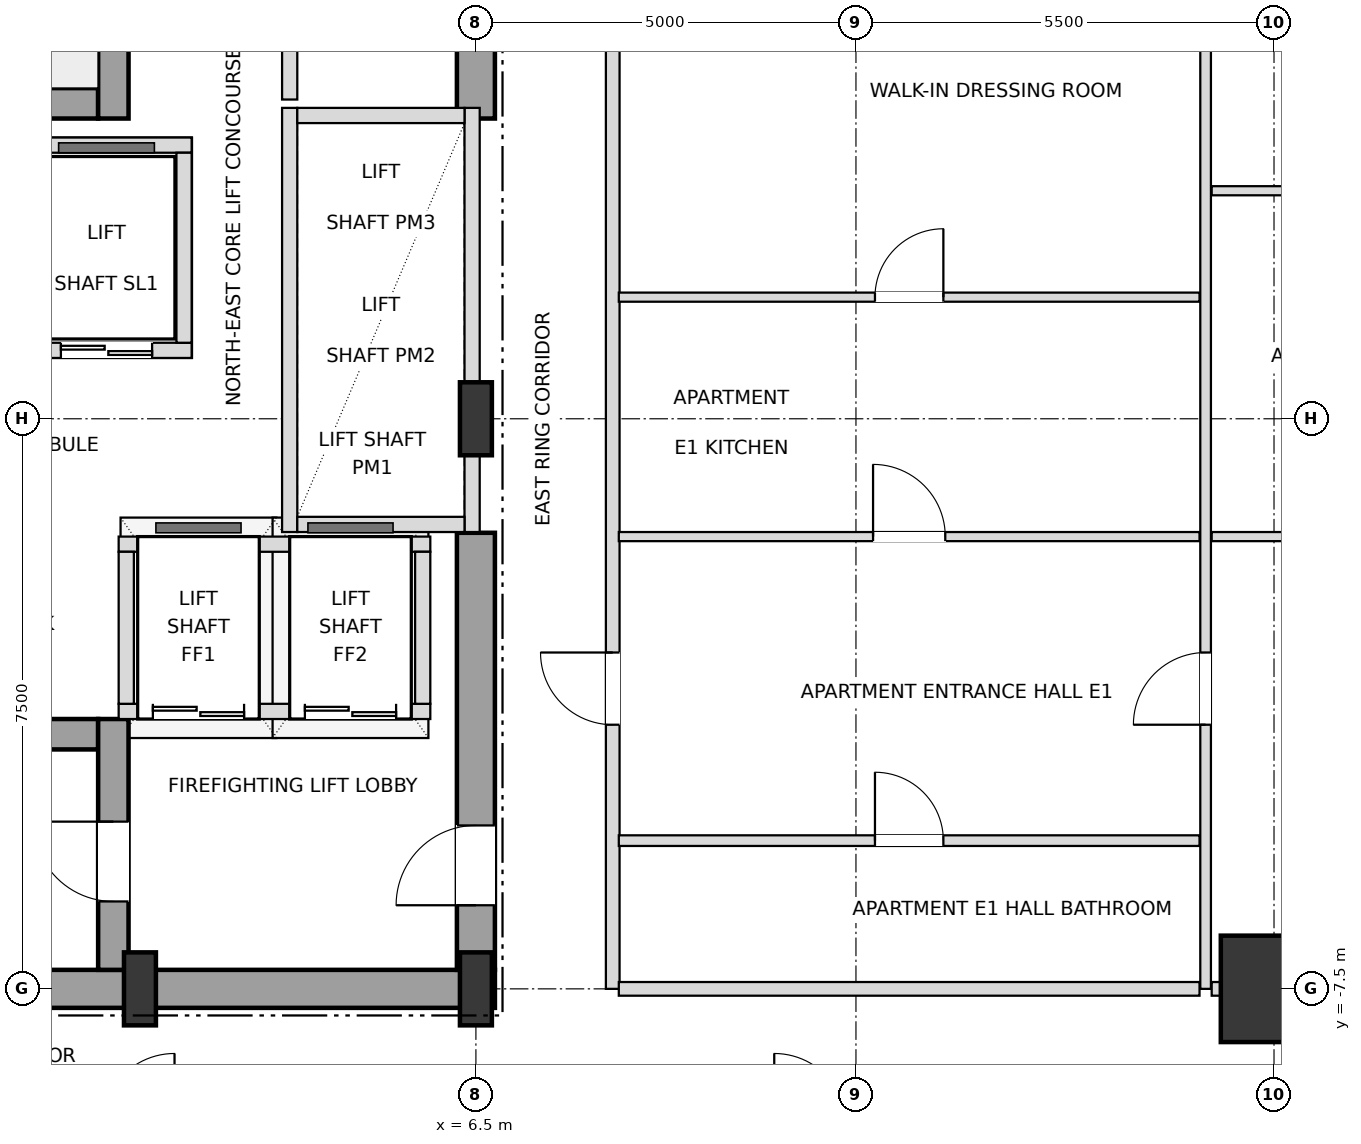
"""IFC4 building model, lengths in metres.
Left out: names, types, materials, properties, quantities, classifications, styles, units other than length and angle.
Written with IfcOpenShell. Run it as: python <this file> out.ifc"""

import sys

from ifc_helpers import new_model, si_unit, direction, frame, frame_2d, origin, origin_2d, place, context, subcontext, project, spatial, rectangle, i_section, extrude, element, fill, save


model = new_model("IFC4")
c1 = context("Model", 3, precision=1e-05, world=origin(), true_north=direction((0.0, 1.0)))
c2 = subcontext(c1, "Body", "Model", "MODEL_VIEW")
j1 = project(units=[si_unit("LENGTHUNIT", "METRE"), si_unit("PLANEANGLEUNIT", "RADIAN")], contexts=[c1])
p1 = place(None, origin())
s1 = spatial("IfcSite", under=j1, at=p1, CompositionType="ELEMENT")
p2 = place(p1, origin())
s2 = spatial("IfcBuilding", under=s1, at=p2, CompositionType="ELEMENT")
p3 = place(p2, frame((0.0, 0.0, 64.8)))
s3 = spatial("IfcBuildingStorey", under=s2, at=p3, CompositionType="ELEMENT", Elevation=64.8)
for number, where, z_axis, x_axis in (
    (1, (2.08, -7.5, 0.0), (0.0, 0.0, 1.0), (1.0, 0.0, 0.0)),
    (2, (6.5, -7.5, 0.0), (0.0, 0.0, 1.0), (1.0, 0.0, 0.0)),
    (3, (6.5, 0.0, 0.0), (0.0, 0.0, 1.0), (1.0, 0.0, 0.0)),
):
    element("IfcColumn", number, at=place(p3, frame(where, z_axis=z_axis, x_axis=x_axis)), inside=s3, PredefinedType="COLUMN", context=c2, shape_type="SweptSolid", body=[
        extrude(i_section(OverallWidth=0.42, OverallDepth=0.96, WebThickness=0.022, FlangeThickness=0.034, at=origin_2d()), origin(), (0.0, 0.0, 1.0), 3.6),
    ])
p4 = place(p3, frame((17.0, -7.5, 0.0), z_axis=(0.0, 0.0, 1.0), x_axis=(1.0, 0.0, 0.0)))
e4 = element("IfcColumn", 4, at=p4, inside=s3, PredefinedType="USERDEFINED", context=c2, shape_type="SweptSolid", body=[
    extrude(rectangle(XDim=1.4, YDim=1.4, at=origin_2d()), origin(), (0.0, 0.0, 1.0), 3.6),
])
p5 = place(p3, frame((0.0, -7.5, 0.0), z_axis=(0.0, 0.0, 1.0), x_axis=(1.0, 0.0, 0.0)))
e5 = element("IfcWall", 5, at=p5, inside=s3, PredefinedType="SHEAR", context=c2, shape_type="SweptSolid", body=[
    extrude(rectangle(XDim=6.75, YDim=0.5, at=frame_2d((3.375, 0.0))), origin(), (0.0, 0.0, 1.0), 3.38),
])
p6 = place(p3, frame((6.5, -7.25, 0.0), z_axis=(0.0, 0.0, 1.0), x_axis=(0.0, 1.0, 0.0)))
e6 = element("IfcWall", 6, at=p6, inside=s3, PredefinedType="SHEAR", context=c2, shape_type="SweptSolid", body=[
    extrude(rectangle(XDim=5.75, YDim=0.5, at=frame_2d((2.875, 0.0))), origin(), (0.0, 0.0, 1.0), 3.38),
])
p7 = place(p6, frame((0.85, 0.0, 0.0)))
e7 = element("IfcOpeningElement", 7, at=p7, cuts=e6, PredefinedType="OPENING", context=c2, shape_type="SweptSolid", body=[
    extrude(rectangle(XDim=1.05, YDim=2.15, at=frame_2d((0.525, 1.075))), frame((0.0, 0.26, 0.0), z_axis=(0.0, -1.0, 0.0), x_axis=(1.0, 0.0, 0.0)), (0.0, 0.0, 1.0), 0.52),
])
p8 = place(p3, frame((6.5, 3.95, 0.0), z_axis=(0.0, 0.0, 1.0), x_axis=(0.0, 1.0, 0.0)))
e8 = element("IfcWall", 8, at=p8, inside=s3, PredefinedType="SHEAR", context=c2, shape_type="SweptSolid", body=[
    extrude(rectangle(XDim=3.3, YDim=0.5, at=frame_2d((1.65, 0.0))), origin(), (0.0, 0.0, 1.0), 3.38),
])
p9 = place(p3, frame((-6.25, -4.15, 0.0), z_axis=(0.0, 0.0, 1.0), x_axis=(1.0, 0.0, 0.0)))
e9 = element("IfcWall", 9, at=p9, inside=s3, PredefinedType="SHEAR", context=c2, shape_type="SweptSolid", body=[
    extrude(rectangle(XDim=7.78, YDim=0.4, at=frame_2d((3.89, 0.0))), origin(), (0.0, 0.0, 1.0), 3.38),
])
p10 = place(p3, frame((1.73, -7.25, 0.0), z_axis=(0.0, 0.0, 1.0), x_axis=(0.0, 1.0, 0.0)))
e10 = element("IfcWall", 10, at=p10, inside=s3, PredefinedType="SHEAR", context=c2, shape_type="SweptSolid", body=[
    extrude(rectangle(XDim=3.3, YDim=0.4, at=frame_2d((1.65, 0.0))), origin(), (0.0, 0.0, 1.0), 3.38),
])
p11 = place(p10, frame((0.9, 0.0, 0.0)))
e11 = element("IfcOpeningElement", 11, at=p11, cuts=e10, PredefinedType="OPENING", context=c2, shape_type="SweptSolid", body=[
    extrude(rectangle(XDim=1.05, YDim=2.15, at=frame_2d((0.525, 1.075))), frame((0.0, 0.21, 0.0), z_axis=(0.0, -1.0, 0.0), x_axis=(1.0, 0.0, 0.0)), (0.0, 0.0, 1.0), 0.42),
])
p12 = place(p3, frame((-5.55, 4.15, 0.0), z_axis=(0.0, 0.0, 1.0), x_axis=(1.0, 0.0, 0.0)))
e12 = element("IfcWall", 12, at=p12, inside=s3, PredefinedType="SHEAR", context=c2, shape_type="SweptSolid", body=[
    extrude(rectangle(XDim=7.08, YDim=0.4, at=frame_2d((3.54, 0.0))), origin(), (0.0, 0.0, 1.0), 3.38),
])
p13 = place(p3, frame((1.73, 3.95, 0.0), z_axis=(0.0, 0.0, 1.0), x_axis=(0.0, 1.0, 0.0)))
e13 = element("IfcWall", 13, at=p13, inside=s3, PredefinedType="SHEAR", context=c2, shape_type="SweptSolid", body=[
    extrude(rectangle(XDim=3.3, YDim=0.4, at=frame_2d((1.65, 0.0))), origin(), (0.0, 0.0, 1.0), 3.38),
])
p14 = place(p3, frame((4.05, -1.49, 0.0), z_axis=(0.0, 0.0, 1.0), x_axis=(0.0, 1.0, 0.0)))
e14 = element("IfcWall", 14, at=p14, inside=s3, PredefinedType="SOLIDWALL", context=c2, shape_type="SweptSolid", body=[
    extrude(rectangle(XDim=5.58, YDim=0.2, at=frame_2d((2.79, 0.0))), origin(), (0.0, 0.0, 1.0), 3.38),
])
p15 = place(p3, frame((6.45, -1.49, 0.0), z_axis=(0.0, 0.0, 1.0), x_axis=(0.0, 1.0, 0.0)))
e15 = element("IfcWall", 15, at=p15, inside=s3, PredefinedType="SOLIDWALL", context=c2, shape_type="SweptSolid", body=[
    extrude(rectangle(XDim=5.58, YDim=0.2, at=frame_2d((2.79, 0.0))), origin(), (0.0, 0.0, 1.0), 2.816),
])
for number, where, z_axis, x_axis in (
    (16, (4.15, -1.39, 0.0), (0.0, 0.0, 1.0), (1.0, 0.0, 0.0)),
    (17, (4.15, 3.99, 0.0), (0.0, 0.0, 1.0), (1.0, 0.0, 0.0)),
):
    element("IfcWall", number, at=place(p3, frame(where, z_axis=z_axis, x_axis=x_axis)), inside=s3, PredefinedType="SOLIDWALL", context=c2, shape_type="SweptSolid", body=[
        extrude(rectangle(XDim=2.2, YDim=0.2, at=frame_2d((1.1, 0.0))), origin(), (0.0, 0.0, 1.0), 3.38),
    ])
p16 = place(p3, frame((-2.82, 0.9, 0.0), z_axis=(0.0, 0.0, 1.0), x_axis=(1.0, 0.0, 0.0)))
e18 = element("IfcWall", 18, at=p16, inside=s3, PredefinedType="SOLIDWALL", context=c2, shape_type="SweptSolid", body=[
    extrude(rectangle(XDim=5.58, YDim=0.2, at=frame_2d((2.79, 0.0))), origin(), (0.0, 0.0, 1.0), 3.38),
])
p17 = place(p16, frame((3.86, 0.0, 0.0)))
e19 = element("IfcOpeningElement", 19, at=p17, cuts=e18, PredefinedType="OPENING", context=c2, shape_type="SweptSolid", body=[
    extrude(rectangle(XDim=1.2, YDim=2.2, at=frame_2d((0.6, 1.1))), frame((0.0, 0.11, 0.0), z_axis=(0.0, -1.0, 0.0), x_axis=(1.0, 0.0, 0.0)), (0.0, 0.0, 1.0), 0.22),
])
p18 = place(p3, frame((-2.82, 3.6, 0.0), z_axis=(0.0, 0.0, 1.0), x_axis=(1.0, 0.0, 0.0)))
e20 = element("IfcWall", 20, at=p18, inside=s3, PredefinedType="SOLIDWALL", context=c2, shape_type="SweptSolid", body=[
    extrude(rectangle(XDim=5.58, YDim=0.2, at=frame_2d((2.79, 0.0))), origin(), (0.0, 0.0, 1.0), 3.38),
])
p19 = place(p3, frame((2.66, 1.0, 0.0), z_axis=(0.0, 0.0, 1.0), x_axis=(0.0, 1.0, 0.0)))
e21 = element("IfcWall", 21, at=p19, inside=s3, PredefinedType="SOLIDWALL", context=c2, shape_type="SweptSolid", body=[
    extrude(rectangle(XDim=2.5, YDim=0.2, at=frame_2d((1.25, 0.0))), origin(), (0.0, 0.0, 1.0), 3.38),
])
p20 = place(p3, frame((1.8, -3.85, 0.0), z_axis=(0.0, 0.0, 1.0), x_axis=(1.0, 0.0, 0.0)))
e22 = element("IfcWall", 22, at=p20, inside=s3, PredefinedType="SOLIDWALL", context=c2, shape_type="SweptSolid", body=[
    extrude(rectangle(XDim=4.1, YDim=0.2, at=frame_2d((2.05, 0.0))), origin(), (0.0, 0.0, 1.0), 3.38),
])
p21 = place(p20, frame((0.45, 0.0, 0.0)))
e23 = element("IfcOpeningElement", 23, at=p21, cuts=e22, PredefinedType="OPENING", context=c2, shape_type="SweptSolid", body=[
    extrude(rectangle(XDim=1.2, YDim=2.2, at=frame_2d((0.6, 1.1))), frame((0.0, 0.11, 0.0), z_axis=(0.0, -1.0, 0.0), x_axis=(1.0, 0.0, 0.0)), (0.0, 0.0, 1.0), 0.22),
])
p22 = place(p20, frame((2.45, 0.0, 0.0)))
e24 = element("IfcOpeningElement", 24, at=p22, cuts=e22, PredefinedType="OPENING", context=c2, shape_type="SweptSolid", body=[
    extrude(rectangle(XDim=1.2, YDim=2.2, at=frame_2d((0.6, 1.1))), frame((0.0, 0.11, 0.0), z_axis=(0.0, -1.0, 0.0), x_axis=(1.0, 0.0, 0.0)), (0.0, 0.0, 1.0), 0.22),
])
p23 = place(p3, frame((1.8, -1.65, 0.0), z_axis=(0.0, 0.0, 1.0), x_axis=(1.0, 0.0, 0.0)))
e25 = element("IfcWall", 25, at=p23, inside=s3, PredefinedType="SOLIDWALL", context=c2, shape_type="SweptSolid", body=[
    extrude(rectangle(XDim=4.1, YDim=0.2, at=frame_2d((2.05, 0.0))), origin(), (0.0, 0.0, 1.0), 3.38),
])
for number, where, z_axis, x_axis in (
    (26, (1.9, -3.75, 0.0), (0.0, 0.0, 1.0), (0.0, 1.0, 0.0)),
    (27, (5.8, -3.75, 0.0), (0.0, 0.0, 1.0), (0.0, 1.0, 0.0)),
):
    element("IfcWall", number, at=place(p3, frame(where, z_axis=z_axis, x_axis=x_axis)), inside=s3, PredefinedType="SOLIDWALL", context=c2, shape_type="SweptSolid", body=[
        extrude(rectangle(XDim=2.0, YDim=0.2, at=frame_2d((1.0, 0.0))), origin(), (0.0, 0.0, 1.0), 3.38),
    ])
p24 = place(p3, frame((4.05, 4.2, 0.0), z_axis=(0.0, 0.0, 1.0), x_axis=(0.0, 1.0, 0.0)))
e28 = element("IfcWall", 28, at=p24, inside=s3, PredefinedType="SOLIDWALL", context=c2, shape_type="SweptSolid", body=[
    extrude(rectangle(XDim=3.05, YDim=0.2, at=frame_2d((1.525, 0.0))), origin(), (0.0, 0.0, 1.0), 3.38),
])
p25 = place(p24, frame((0.975, 0.0, 0.0)))
e29 = element("IfcOpeningElement", 29, at=p25, cuts=e28, PredefinedType="OPENING", context=c2, shape_type="SweptSolid", body=[
    extrude(rectangle(XDim=0.95, YDim=2.15, at=frame_2d((0.475, 1.075))), frame((0.0, 0.11, 0.0), z_axis=(0.0, -1.0, 0.0), x_axis=(1.0, 0.0, 0.0)), (0.0, 0.0, 1.0), 0.22),
])
p26 = place(p3, frame((8.3, -7.5, 0.0), z_axis=(0.0, 0.0, 1.0), x_axis=(0.0, 1.0, 0.0)))
e30 = element("IfcWall", 30, at=p26, inside=s3, PredefinedType="PARTITIONING", context=c2, shape_type="SweptSolid", body=[
    extrude(rectangle(XDim=15.0, YDim=0.18, at=frame_2d((7.5, 0.0))), origin(), (0.0, 0.0, 1.0), 3.38),
])
p27 = place(p26, frame((3.475, 0.0, 0.0)))
e31 = element("IfcOpeningElement", 31, at=p27, cuts=e30, PredefinedType="OPENING", context=c2, shape_type="SweptSolid", body=[
    extrude(rectangle(XDim=0.95, YDim=2.15, at=frame_2d((0.475, 1.075))), frame((0.0, 0.1, 0.0), z_axis=(0.0, -1.0, 0.0), x_axis=(1.0, 0.0, 0.0)), (0.0, 0.0, 1.0), 0.2),
])
p28 = place(p3, frame((16.1, -7.5, 0.0), z_axis=(0.0, 0.0, 1.0), x_axis=(0.0, 1.0, 0.0)))
e32 = element("IfcWall", 32, at=p28, inside=s3, PredefinedType="PARTITIONING", context=c2, shape_type="SweptSolid", body=[
    extrude(rectangle(XDim=15.0, YDim=0.14, at=frame_2d((7.5, 0.0))), origin(), (0.0, 0.0, 1.0), 3.38),
])
p29 = place(p28, frame((3.475, 0.0, 0.0)))
e33 = element("IfcOpeningElement", 33, at=p29, cuts=e32, PredefinedType="OPENING", context=c2, shape_type="SweptSolid", body=[
    extrude(rectangle(XDim=0.95, YDim=2.1, at=frame_2d((0.475, 1.05))), frame((0.0, 0.08, 0.0), z_axis=(0.0, -1.0, 0.0), x_axis=(1.0, 0.0, 0.0)), (0.0, 0.0, 1.0), 0.16),
])
p30 = place(p3, frame((8.38, -7.5, 0.0), z_axis=(0.0, 0.0, 1.0), x_axis=(1.0, 0.0, 0.0)))
e34 = element("IfcWall", 34, at=p30, inside=s3, PredefinedType="PARTITIONING", context=c2, shape_type="SweptSolid", body=[
    extrude(rectangle(XDim=7.64, YDim=0.18, at=frame_2d((3.82, 0.0))), origin(), (0.0, 0.0, 1.0), 2.816),
])
p31 = place(p3, frame((16.18, -7.5, 0.0), z_axis=(0.0, 0.0, 1.0), x_axis=(1.0, 0.0, 0.0)))
e35 = element("IfcWall", 35, at=p31, inside=s3, PredefinedType="PARTITIONING", context=c2, shape_type="SweptSolid", body=[
    extrude(rectangle(XDim=5.72, YDim=0.18, at=frame_2d((2.86, 0.0))), origin(), (0.0, 0.0, 1.0), 2.816),
])
p32 = place(p3, frame((8.38, -5.55, 0.0), z_axis=(0.0, 0.0, 1.0), x_axis=(1.0, 0.0, 0.0)))
e36 = element("IfcWall", 36, at=p32, inside=s3, PredefinedType="PARTITIONING", context=c2, shape_type="SweptSolid", body=[
    extrude(rectangle(XDim=7.64, YDim=0.14, at=frame_2d((3.82, 0.0))), origin(), (0.0, 0.0, 1.0), 2.948),
])
p33 = place(p32, frame((3.37, 0.0, 0.0)))
e37 = element("IfcOpeningElement", 37, at=p33, cuts=e36, PredefinedType="OPENING", context=c2, shape_type="SweptSolid", body=[
    extrude(rectangle(XDim=0.9, YDim=2.1, at=frame_2d((0.45, 1.05))), frame((0.0, 0.08, 0.0), z_axis=(0.0, -1.0, 0.0), x_axis=(1.0, 0.0, 0.0)), (0.0, 0.0, 1.0), 0.16),
])
p34 = place(p3, frame((8.38, -1.55, 0.0), z_axis=(0.0, 0.0, 1.0), x_axis=(1.0, 0.0, 0.0)))
e38 = element("IfcWall", 38, at=p34, inside=s3, PredefinedType="PARTITIONING", context=c2, shape_type="SweptSolid", body=[
    extrude(rectangle(XDim=7.64, YDim=0.12, at=frame_2d((3.82, 0.0))), origin(), (0.0, 0.0, 1.0), 2.948),
])
p35 = place(p34, frame((3.345, 0.0, 0.0)))
e39 = element("IfcOpeningElement", 39, at=p35, cuts=e38, PredefinedType="OPENING", context=c2, shape_type="SweptSolid", body=[
    extrude(rectangle(XDim=0.95, YDim=2.1, at=frame_2d((0.475, 1.05))), frame((0.0, 0.07, 0.0), z_axis=(0.0, -1.0, 0.0), x_axis=(1.0, 0.0, 0.0)), (0.0, 0.0, 1.0), 0.14),
])
p36 = place(p3, frame((16.18, -1.55, 0.0), z_axis=(0.0, 0.0, 1.0), x_axis=(1.0, 0.0, 0.0)))
e40 = element("IfcWall", 40, at=p36, inside=s3, PredefinedType="PARTITIONING", context=c2, shape_type="SweptSolid", body=[
    extrude(rectangle(XDim=5.64, YDim=0.12, at=frame_2d((2.82, 0.0))), origin(), (0.0, 0.0, 1.0), 2.816),
])
p37 = place(p36, frame((2.37, 0.0, 0.0)))
e41 = element("IfcOpeningElement", 41, at=p37, cuts=e40, PredefinedType="OPENING", context=c2, shape_type="SweptSolid", body=[
    extrude(rectangle(XDim=0.9, YDim=2.1, at=frame_2d((0.45, 1.05))), frame((0.0, 0.07, 0.0), z_axis=(0.0, -1.0, 0.0), x_axis=(1.0, 0.0, 0.0)), (0.0, 0.0, 1.0), 0.14),
])
p38 = place(p3, frame((8.38, 1.6, 0.0), z_axis=(0.0, 0.0, 1.0), x_axis=(1.0, 0.0, 0.0)))
e42 = element("IfcWall", 42, at=p38, inside=s3, PredefinedType="PARTITIONING", context=c2, shape_type="SweptSolid", body=[
    extrude(rectangle(XDim=7.64, YDim=0.12, at=frame_2d((3.82, 0.0))), origin(), (0.0, 0.0, 1.0), 2.948),
])
p39 = place(p38, frame((3.37, 0.0, 0.0)))
e43 = element("IfcOpeningElement", 43, at=p39, cuts=e42, PredefinedType="OPENING", context=c2, shape_type="SweptSolid", body=[
    extrude(rectangle(XDim=0.9, YDim=2.1, at=frame_2d((0.45, 1.05))), frame((0.0, 0.07, 0.0), z_axis=(0.0, -1.0, 0.0), x_axis=(1.0, 0.0, 0.0)), (0.0, 0.0, 1.0), 0.14),
])
p40 = place(p3, frame((16.18, 3.0, 0.0), z_axis=(0.0, 0.0, 1.0), x_axis=(1.0, 0.0, 0.0)))
e44 = element("IfcWall", 44, at=p40, inside=s3, PredefinedType="PARTITIONING", context=c2, shape_type="SweptSolid", body=[
    extrude(rectangle(XDim=5.64, YDim=0.12, at=frame_2d((2.82, 0.0))), origin(), (0.0, 0.0, 1.0), 2.816),
])
p41 = place(p40, frame((2.37, 0.0, 0.0)))
e45 = element("IfcOpeningElement", 45, at=p41, cuts=e44, PredefinedType="OPENING", context=c2, shape_type="SweptSolid", body=[
    extrude(rectangle(XDim=0.9, YDim=2.1, at=frame_2d((0.45, 1.05))), frame((0.0, 0.07, 0.0), z_axis=(0.0, -1.0, 0.0), x_axis=(1.0, 0.0, 0.0)), (0.0, 0.0, 1.0), 0.14),
])
p42 = place(p7, origin())
e46 = element("IfcDoor", 46, at=p42, inside=s3, OperationType="SINGLE_SWING_LEFT", PredefinedType="DOOR", context=c2, shape_type="SweptSolid", body=[
    extrude(rectangle(XDim=1.05, YDim=2.15, at=frame_2d((0.525, 1.075))), frame((0.0, 0.025, 0.0), z_axis=(0.0, -1.0, 0.0), x_axis=(1.0, 0.0, 0.0)), (0.0, 0.0, 1.0), 0.05),
])
fill(e7, e46)
p43 = place(p11, origin())
e47 = element("IfcDoor", 47, at=p43, inside=s3, OperationType="SINGLE_SWING_RIGHT", PredefinedType="DOOR", context=c2, shape_type="SweptSolid", body=[
    extrude(rectangle(XDim=1.05, YDim=2.15, at=frame_2d((0.525, 1.075))), frame((0.0, 0.025, 0.0), z_axis=(0.0, -1.0, 0.0), x_axis=(1.0, 0.0, 0.0)), (0.0, 0.0, 1.0), 0.05),
])
fill(e11, e47)
p44 = place(p17, origin())
e48 = element("IfcDoor", 48, at=p44, inside=s3, OperationType="DOUBLE_DOOR_SLIDING", PredefinedType="DOOR", context=c2, shape_type="SweptSolid", body=[
    extrude(rectangle(XDim=1.2, YDim=2.2, at=frame_2d((0.6, 1.1))), frame((0.0, 0.025, 0.0), z_axis=(0.0, -1.0, 0.0), x_axis=(1.0, 0.0, 0.0)), (0.0, 0.0, 1.0), 0.05),
])
fill(e19, e48)
p45 = place(p21, origin())
e49 = element("IfcDoor", 49, at=p45, inside=s3, OperationType="DOUBLE_DOOR_SLIDING", PredefinedType="DOOR", context=c2, shape_type="SweptSolid", body=[
    extrude(rectangle(XDim=1.2, YDim=2.2, at=frame_2d((0.6, 1.1))), frame((0.0, 0.025, 0.0), z_axis=(0.0, -1.0, 0.0), x_axis=(1.0, 0.0, 0.0)), (0.0, 0.0, 1.0), 0.05),
])
fill(e23, e49)
p46 = place(p22, origin())
e50 = element("IfcDoor", 50, at=p46, inside=s3, OperationType="DOUBLE_DOOR_SLIDING", PredefinedType="DOOR", context=c2, shape_type="SweptSolid", body=[
    extrude(rectangle(XDim=1.2, YDim=2.2, at=frame_2d((0.6, 1.1))), frame((0.0, 0.025, 0.0), z_axis=(0.0, -1.0, 0.0), x_axis=(1.0, 0.0, 0.0)), (0.0, 0.0, 1.0), 0.05),
])
fill(e24, e50)
p47 = place(p33, origin())
e51 = element("IfcDoor", 51, at=p47, inside=s3, OperationType="SINGLE_SWING_LEFT", PredefinedType="DOOR", context=c2, shape_type="SweptSolid", body=[
    extrude(rectangle(XDim=0.9, YDim=2.1, at=frame_2d((0.45, 1.05))), frame((0.0, 0.025, 0.0), z_axis=(0.0, -1.0, 0.0), x_axis=(1.0, 0.0, 0.0)), (0.0, 0.0, 1.0), 0.05),
])
fill(e37, e51)
p48 = place(p27, origin())
e52 = element("IfcDoor", 52, at=p48, inside=s3, OperationType="SINGLE_SWING_RIGHT", PredefinedType="DOOR", context=c2, shape_type="SweptSolid", body=[
    extrude(rectangle(XDim=0.95, YDim=2.15, at=frame_2d((0.475, 1.075))), frame((0.0, 0.025, 0.0), z_axis=(0.0, -1.0, 0.0), x_axis=(1.0, 0.0, 0.0)), (0.0, 0.0, 1.0), 0.05),
])
fill(e31, e52)
p49 = place(p35, origin())
e53 = element("IfcDoor", 53, at=p49, inside=s3, OperationType="SINGLE_SWING_LEFT", PredefinedType="DOOR", context=c2, shape_type="SweptSolid", body=[
    extrude(rectangle(XDim=0.95, YDim=2.1, at=frame_2d((0.475, 1.05))), frame((0.0, 0.025, 0.0), z_axis=(0.0, -1.0, 0.0), x_axis=(1.0, 0.0, 0.0)), (0.0, 0.0, 1.0), 0.05),
])
fill(e39, e53)
p50 = place(p39, origin())
e54 = element("IfcDoor", 54, at=p50, inside=s3, OperationType="SINGLE_SWING_RIGHT", PredefinedType="DOOR", context=c2, shape_type="SweptSolid", body=[
    extrude(rectangle(XDim=0.9, YDim=2.1, at=frame_2d((0.45, 1.05))), frame((0.0, 0.025, 0.0), z_axis=(0.0, -1.0, 0.0), x_axis=(1.0, 0.0, 0.0)), (0.0, 0.0, 1.0), 0.05),
])
fill(e43, e54)
p51 = place(p29, origin())
e55 = element("IfcDoor", 55, at=p51, inside=s3, OperationType="SINGLE_SWING_LEFT", PredefinedType="DOOR", context=c2, shape_type="SweptSolid", body=[
    extrude(rectangle(XDim=0.95, YDim=2.1, at=frame_2d((0.475, 1.05))), frame((0.0, 0.025, 0.0), z_axis=(0.0, -1.0, 0.0), x_axis=(1.0, 0.0, 0.0)), (0.0, 0.0, 1.0), 0.05),
])
fill(e33, e55)
save(model, sys.argv[1])
